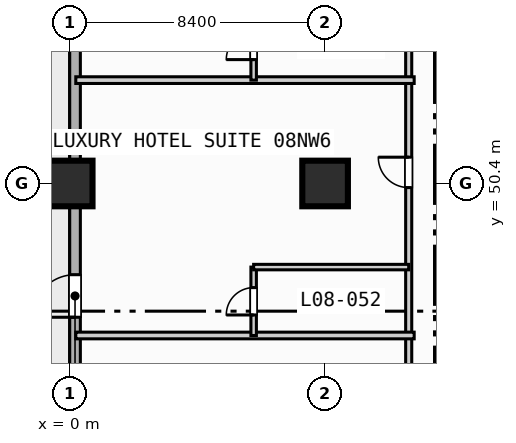
"""IFC4 building model, lengths in metres.
Left out: names, types, materials, properties, quantities, classifications, styles, units other than length and angle.
Written with IfcOpenShell. Run it as: python <this file> out.ifc"""

import sys

from ifc_helpers import new_model, si_unit, direction, frame, frame_2d, origin, origin_2d, place, context, subcontext, project, spatial, rectangle, extrude, element, fill, save


model = new_model("IFC4")
c1 = context("Model", 3, precision=1e-05, world=origin(), true_north=direction((0.0, 1.0)))
c2 = subcontext(c1, "Body", "Model", "MODEL_VIEW")
j1 = project(units=[si_unit("LENGTHUNIT", "METRE"), si_unit("PLANEANGLEUNIT", "RADIAN")], contexts=[c1])
p1 = place(None, origin())
s1 = spatial("IfcSite", under=j1, at=p1, CompositionType="ELEMENT")
p2 = place(p1, origin())
s2 = spatial("IfcBuilding", under=s1, at=p2, CompositionType="ELEMENT")
p3 = place(p2, frame((0.0, 0.0, 39.6)))
s3 = spatial("IfcBuildingStorey", under=s2, at=p3, CompositionType="ELEMENT", Elevation=39.6)
for number, where, z_axis, x_axis in (
    (1, (0.0, 50.4, 0.0), (0.0, 0.0, 1.0), (1.0, 0.0, 0.0)),
    (2, (8.4, 50.4, 0.0), (0.0, 0.0, 1.0), (1.0, 0.0, 0.0)),
):
    element("IfcColumn", number, at=place(p3, frame(where, z_axis=z_axis, x_axis=x_axis)), inside=s3, PredefinedType="COLUMN", context=c2, shape_type="SweptSolid", body=[
        extrude(rectangle(XDim=1.5, YDim=1.5, at=origin_2d()), origin(), (0.0, 0.0, 1.0), 3.8),
    ])
p4 = place(p3, frame((0.175, 3.175, 0.0), z_axis=(0.0, 0.0, 1.0), x_axis=(0.0, 1.0, 0.0)))
e3 = element("IfcWall", 3, at=p4, inside=s3, PredefinedType="STANDARD", context=c2, shape_type="SweptSolid", body=[
    extrude(rectangle(XDim=86.05, YDim=0.35, at=frame_2d((43.025, 0.0))), origin(), (0.0, 0.0, 1.0), 3.55),
])
p5 = place(p4, frame((42.825, 0.0, 0.0)))
e4 = element("IfcOpeningElement", 4, at=p5, cuts=e3, PredefinedType="OPENING", context=c2, shape_type="SweptSolid", body=[
    extrude(rectangle(XDim=1.4, YDim=2.2, at=frame_2d((0.7, 1.1))), frame((0.0, 0.185, 0.0), z_axis=(0.0, -1.0, 0.0), x_axis=(1.0, 0.0, 0.0)), (0.0, 0.0, 1.0), 0.37),
])
p6 = place(p4, frame((2.525, 0.0, 0.85)))
e5 = element("IfcOpeningElement", 5, at=p6, cuts=e3, PredefinedType="OPENING", context=c2, shape_type="SweptSolid", body=[
    extrude(rectangle(XDim=1.8, YDim=1.8, at=frame_2d((0.9, 0.9))), frame((0.0, 0.185, 0.0), z_axis=(0.0, -1.0, 0.0), x_axis=(1.0, 0.0, 0.0)), (0.0, 0.0, 1.0), 0.37),
])
p7 = place(p4, frame((10.925, 0.0, 0.85)))
e6 = element("IfcOpeningElement", 6, at=p7, cuts=e3, PredefinedType="OPENING", context=c2, shape_type="SweptSolid", body=[
    extrude(rectangle(XDim=1.8, YDim=1.8, at=frame_2d((0.9, 0.9))), frame((0.0, 0.185, 0.0), z_axis=(0.0, -1.0, 0.0), x_axis=(1.0, 0.0, 0.0)), (0.0, 0.0, 1.0), 0.37),
])
p8 = place(p4, frame((19.325, 0.0, 0.85)))
e7 = element("IfcOpeningElement", 7, at=p8, cuts=e3, PredefinedType="OPENING", context=c2, shape_type="SweptSolid", body=[
    extrude(rectangle(XDim=1.8, YDim=1.8, at=frame_2d((0.9, 0.9))), frame((0.0, 0.185, 0.0), z_axis=(0.0, -1.0, 0.0), x_axis=(1.0, 0.0, 0.0)), (0.0, 0.0, 1.0), 0.37),
])
p9 = place(p4, frame((27.725, 0.0, 0.85)))
e8 = element("IfcOpeningElement", 8, at=p9, cuts=e3, PredefinedType="OPENING", context=c2, shape_type="SweptSolid", body=[
    extrude(rectangle(XDim=1.8, YDim=1.8, at=frame_2d((0.9, 0.9))), frame((0.0, 0.185, 0.0), z_axis=(0.0, -1.0, 0.0), x_axis=(1.0, 0.0, 0.0)), (0.0, 0.0, 1.0), 0.37),
])
p10 = place(p4, frame((36.125, 0.0, 0.85)))
e9 = element("IfcOpeningElement", 9, at=p10, cuts=e3, PredefinedType="OPENING", context=c2, shape_type="SweptSolid", body=[
    extrude(rectangle(XDim=1.8, YDim=1.8, at=frame_2d((0.9, 0.9))), frame((0.0, 0.185, 0.0), z_axis=(0.0, -1.0, 0.0), x_axis=(1.0, 0.0, 0.0)), (0.0, 0.0, 1.0), 0.37),
])
p11 = place(p4, frame((52.925, 0.0, 0.85)))
e10 = element("IfcOpeningElement", 10, at=p11, cuts=e3, PredefinedType="OPENING", context=c2, shape_type="SweptSolid", body=[
    extrude(rectangle(XDim=1.8, YDim=1.8, at=frame_2d((0.9, 0.9))), frame((0.0, 0.185, 0.0), z_axis=(0.0, -1.0, 0.0), x_axis=(1.0, 0.0, 0.0)), (0.0, 0.0, 1.0), 0.37),
])
p12 = place(p4, frame((61.325, 0.0, 0.85)))
e11 = element("IfcOpeningElement", 11, at=p12, cuts=e3, PredefinedType="OPENING", context=c2, shape_type="SweptSolid", body=[
    extrude(rectangle(XDim=1.8, YDim=1.8, at=frame_2d((0.9, 0.9))), frame((0.0, 0.185, 0.0), z_axis=(0.0, -1.0, 0.0), x_axis=(1.0, 0.0, 0.0)), (0.0, 0.0, 1.0), 0.37),
])
p13 = place(p4, frame((69.725, 0.0, 0.85)))
e12 = element("IfcOpeningElement", 12, at=p13, cuts=e3, PredefinedType="OPENING", context=c2, shape_type="SweptSolid", body=[
    extrude(rectangle(XDim=1.8, YDim=1.8, at=frame_2d((0.9, 0.9))), frame((0.0, 0.185, 0.0), z_axis=(0.0, -1.0, 0.0), x_axis=(1.0, 0.0, 0.0)), (0.0, 0.0, 1.0), 0.37),
])
p14 = place(p4, frame((78.075, 0.0, 0.85)))
e13 = element("IfcOpeningElement", 13, at=p14, cuts=e3, PredefinedType="OPENING", context=c2, shape_type="SweptSolid", body=[
    extrude(rectangle(XDim=1.8, YDim=1.8, at=frame_2d((0.9, 0.9))), frame((0.0, 0.185, 0.0), z_axis=(0.0, -1.0, 0.0), x_axis=(1.0, 0.0, 0.0)), (0.0, 0.0, 1.0), 0.37),
])
p15 = place(p3, frame((11.15, 3.4, 0.0), z_axis=(0.0, 0.0, 1.0), x_axis=(0.0, 1.0, 0.0)))
e14 = element("IfcWall", 14, at=p15, inside=s3, PredefinedType="PARTITIONING", context=c2, shape_type="SweptSolid", body=[
    extrude(rectangle(XDim=85.4, YDim=0.2, at=frame_2d((42.7, 0.0))), origin(), (0.0, 0.0, 1.0), 3.55),
])
p16 = place(p15, frame((4.865, 0.0, 0.0)))
e15 = element("IfcOpeningElement", 15, at=p16, cuts=e14, PredefinedType="OPENING", context=c2, shape_type="SweptSolid", body=[
    extrude(rectangle(XDim=1.0, YDim=2.15, at=frame_2d((0.5, 1.075))), frame((0.0, 0.11, 0.0), z_axis=(0.0, -1.0, 0.0), x_axis=(1.0, 0.0, 0.0)), (0.0, 0.0, 1.0), 0.22),
])
p17 = place(p15, frame((13.265, 0.0, 0.0)))
e16 = element("IfcOpeningElement", 16, at=p17, cuts=e14, PredefinedType="OPENING", context=c2, shape_type="SweptSolid", body=[
    extrude(rectangle(XDim=1.0, YDim=2.15, at=frame_2d((0.5, 1.075))), frame((0.0, 0.11, 0.0), z_axis=(0.0, -1.0, 0.0), x_axis=(1.0, 0.0, 0.0)), (0.0, 0.0, 1.0), 0.22),
])
p18 = place(p15, frame((21.665, 0.0, 0.0)))
e17 = element("IfcOpeningElement", 17, at=p18, cuts=e14, PredefinedType="OPENING", context=c2, shape_type="SweptSolid", body=[
    extrude(rectangle(XDim=1.0, YDim=2.15, at=frame_2d((0.5, 1.075))), frame((0.0, 0.11, 0.0), z_axis=(0.0, -1.0, 0.0), x_axis=(1.0, 0.0, 0.0)), (0.0, 0.0, 1.0), 0.22),
])
p19 = place(p15, frame((30.065, 0.0, 0.0)))
e18 = element("IfcOpeningElement", 18, at=p19, cuts=e14, PredefinedType="OPENING", context=c2, shape_type="SweptSolid", body=[
    extrude(rectangle(XDim=1.0, YDim=2.15, at=frame_2d((0.5, 1.075))), frame((0.0, 0.11, 0.0), z_axis=(0.0, -1.0, 0.0), x_axis=(1.0, 0.0, 0.0)), (0.0, 0.0, 1.0), 0.22),
])
p20 = place(p15, frame((38.465, 0.0, 0.0)))
e19 = element("IfcOpeningElement", 19, at=p20, cuts=e14, PredefinedType="OPENING", context=c2, shape_type="SweptSolid", body=[
    extrude(rectangle(XDim=1.0, YDim=2.15, at=frame_2d((0.5, 1.075))), frame((0.0, 0.11, 0.0), z_axis=(0.0, -1.0, 0.0), x_axis=(1.0, 0.0, 0.0)), (0.0, 0.0, 1.0), 0.22),
])
p21 = place(p15, frame((46.865, 0.0, 0.0)))
e20 = element("IfcOpeningElement", 20, at=p21, cuts=e14, PredefinedType="OPENING", context=c2, shape_type="SweptSolid", body=[
    extrude(rectangle(XDim=1.0, YDim=2.15, at=frame_2d((0.5, 1.075))), frame((0.0, 0.11, 0.0), z_axis=(0.0, -1.0, 0.0), x_axis=(1.0, 0.0, 0.0)), (0.0, 0.0, 1.0), 0.22),
])
p22 = place(p15, frame((55.265, 0.0, 0.0)))
e21 = element("IfcOpeningElement", 21, at=p22, cuts=e14, PredefinedType="OPENING", context=c2, shape_type="SweptSolid", body=[
    extrude(rectangle(XDim=1.0, YDim=2.15, at=frame_2d((0.5, 1.075))), frame((0.0, 0.11, 0.0), z_axis=(0.0, -1.0, 0.0), x_axis=(1.0, 0.0, 0.0)), (0.0, 0.0, 1.0), 0.22),
])
p23 = place(p15, frame((63.665, 0.0, 0.0)))
e22 = element("IfcOpeningElement", 22, at=p23, cuts=e14, PredefinedType="OPENING", context=c2, shape_type="SweptSolid", body=[
    extrude(rectangle(XDim=1.0, YDim=2.15, at=frame_2d((0.5, 1.075))), frame((0.0, 0.11, 0.0), z_axis=(0.0, -1.0, 0.0), x_axis=(1.0, 0.0, 0.0)), (0.0, 0.0, 1.0), 0.22),
])
p24 = place(p15, frame((72.065, 0.0, 0.0)))
e23 = element("IfcOpeningElement", 23, at=p24, cuts=e14, PredefinedType="OPENING", context=c2, shape_type="SweptSolid", body=[
    extrude(rectangle(XDim=1.0, YDim=2.15, at=frame_2d((0.5, 1.075))), frame((0.0, 0.11, 0.0), z_axis=(0.0, -1.0, 0.0), x_axis=(1.0, 0.0, 0.0)), (0.0, 0.0, 1.0), 0.22),
])
p25 = place(p15, frame((81.165, 0.0, 0.0)))
e24 = element("IfcOpeningElement", 24, at=p25, cuts=e14, PredefinedType="OPENING", context=c2, shape_type="SweptSolid", body=[
    extrude(rectangle(XDim=1.0, YDim=2.15, at=frame_2d((0.5, 1.075))), frame((0.0, 0.11, 0.0), z_axis=(0.0, -1.0, 0.0), x_axis=(1.0, 0.0, 0.0)), (0.0, 0.0, 1.0), 0.22),
])
p26 = place(p3, frame((0.2, 45.4, 0.0), z_axis=(0.0, 0.0, 1.0), x_axis=(1.0, 0.0, 0.0)))
e25 = element("IfcWall", 25, at=p26, inside=s3, PredefinedType="PARTITIONING", context=c2, shape_type="SweptSolid", body=[
    extrude(rectangle(XDim=11.13, YDim=0.22, at=frame_2d((5.565, 0.0))), origin(), (0.0, 0.0, 1.0), 3.55),
])
p27 = place(p3, frame((6.05, 45.4, 0.0), z_axis=(0.0, 0.0, 1.0), x_axis=(0.0, 1.0, 0.0)))
e26 = element("IfcWall", 26, at=p27, inside=s3, PredefinedType="PLUMBINGWALL", context=c2, shape_type="SweptSolid", body=[
    extrude(rectangle(XDim=2.25, YDim=0.18, at=frame_2d((1.125, 0.0))), origin(), (0.0, 0.0, 1.0), 3.55),
])
p28 = place(p27, frame((0.675, 0.0, 0.0)))
e27 = element("IfcOpeningElement", 27, at=p28, cuts=e26, PredefinedType="OPENING", context=c2, shape_type="SweptSolid", body=[
    extrude(rectangle(XDim=0.9, YDim=2.1, at=frame_2d((0.45, 1.05))), frame((0.0, 0.1, 0.0), z_axis=(0.0, -1.0, 0.0), x_axis=(1.0, 0.0, 0.0)), (0.0, 0.0, 1.0), 0.2),
])
p29 = place(p3, frame((6.05, 47.65, 0.0), z_axis=(0.0, 0.0, 1.0), x_axis=(1.0, 0.0, 0.0)))
e28 = element("IfcWall", 28, at=p29, inside=s3, PredefinedType="PLUMBINGWALL", context=c2, shape_type="SweptSolid", body=[
    extrude(rectangle(XDim=5.1, YDim=0.18, at=frame_2d((2.55, 0.0))), origin(), (0.0, 0.0, 1.0), 3.55),
])
p30 = place(p3, frame((0.2, 53.8, 0.0), z_axis=(0.0, 0.0, 1.0), x_axis=(1.0, 0.0, 0.0)))
e29 = element("IfcWall", 29, at=p30, inside=s3, PredefinedType="PARTITIONING", context=c2, shape_type="SweptSolid", body=[
    extrude(rectangle(XDim=11.13, YDim=0.22, at=frame_2d((5.565, 0.0))), origin(), (0.0, 0.0, 1.0), 3.55),
])
p31 = place(p3, frame((6.05, 53.8, 0.0), z_axis=(0.0, 0.0, 1.0), x_axis=(0.0, 1.0, 0.0)))
e30 = element("IfcWall", 30, at=p31, inside=s3, PredefinedType="PLUMBINGWALL", context=c2, shape_type="SweptSolid", body=[
    extrude(rectangle(XDim=2.25, YDim=0.18, at=frame_2d((1.125, 0.0))), origin(), (0.0, 0.0, 1.0), 3.55),
])
p32 = place(p31, frame((0.675, 0.0, 0.0)))
e31 = element("IfcOpeningElement", 31, at=p32, cuts=e30, PredefinedType="OPENING", context=c2, shape_type="SweptSolid", body=[
    extrude(rectangle(XDim=0.9, YDim=2.1, at=frame_2d((0.45, 1.05))), frame((0.0, 0.1, 0.0), z_axis=(0.0, -1.0, 0.0), x_axis=(1.0, 0.0, 0.0)), (0.0, 0.0, 1.0), 0.2),
])
p33 = place(p5, origin())
e32 = element("IfcDoor", 32, at=p33, inside=s3, OperationType="SINGLE_SWING_LEFT", PredefinedType="DOOR", context=c2, shape_type="SweptSolid", body=[
    extrude(rectangle(XDim=1.4, YDim=2.2, at=frame_2d((0.7, 1.1))), frame((0.0, 0.025, 0.0), z_axis=(0.0, -1.0, 0.0), x_axis=(1.0, 0.0, 0.0)), (0.0, 0.0, 1.0), 0.05),
])
fill(e4, e32)
p34 = place(p21, origin())
e33 = element("IfcDoor", 33, at=p34, inside=s3, OperationType="SINGLE_SWING_RIGHT", PredefinedType="DOOR", context=c2, shape_type="SweptSolid", body=[
    extrude(rectangle(XDim=1.0, YDim=2.15, at=frame_2d((0.5, 1.075))), frame((0.0, 0.025, 0.0), z_axis=(0.0, -1.0, 0.0), x_axis=(1.0, 0.0, 0.0)), (0.0, 0.0, 1.0), 0.05),
])
fill(e20, e33)
p35 = place(p28, origin())
e34 = element("IfcDoor", 34, at=p35, inside=s3, OperationType="SINGLE_SWING_LEFT", PredefinedType="DOOR", context=c2, shape_type="SweptSolid", body=[
    extrude(rectangle(XDim=0.9, YDim=2.1, at=frame_2d((0.45, 1.05))), frame((0.0, 0.025, 0.0), z_axis=(0.0, -1.0, 0.0), x_axis=(1.0, 0.0, 0.0)), (0.0, 0.0, 1.0), 0.05),
])
fill(e27, e34)
p36 = place(p32, origin())
e35 = element("IfcDoor", 35, at=p36, inside=s3, OperationType="SINGLE_SWING_LEFT", PredefinedType="DOOR", context=c2, shape_type="SweptSolid", body=[
    extrude(rectangle(XDim=0.9, YDim=2.1, at=frame_2d((0.45, 1.05))), frame((0.0, 0.025, 0.0), z_axis=(0.0, -1.0, 0.0), x_axis=(1.0, 0.0, 0.0)), (0.0, 0.0, 1.0), 0.05),
])
fill(e31, e35)
save(model, sys.argv[1])
